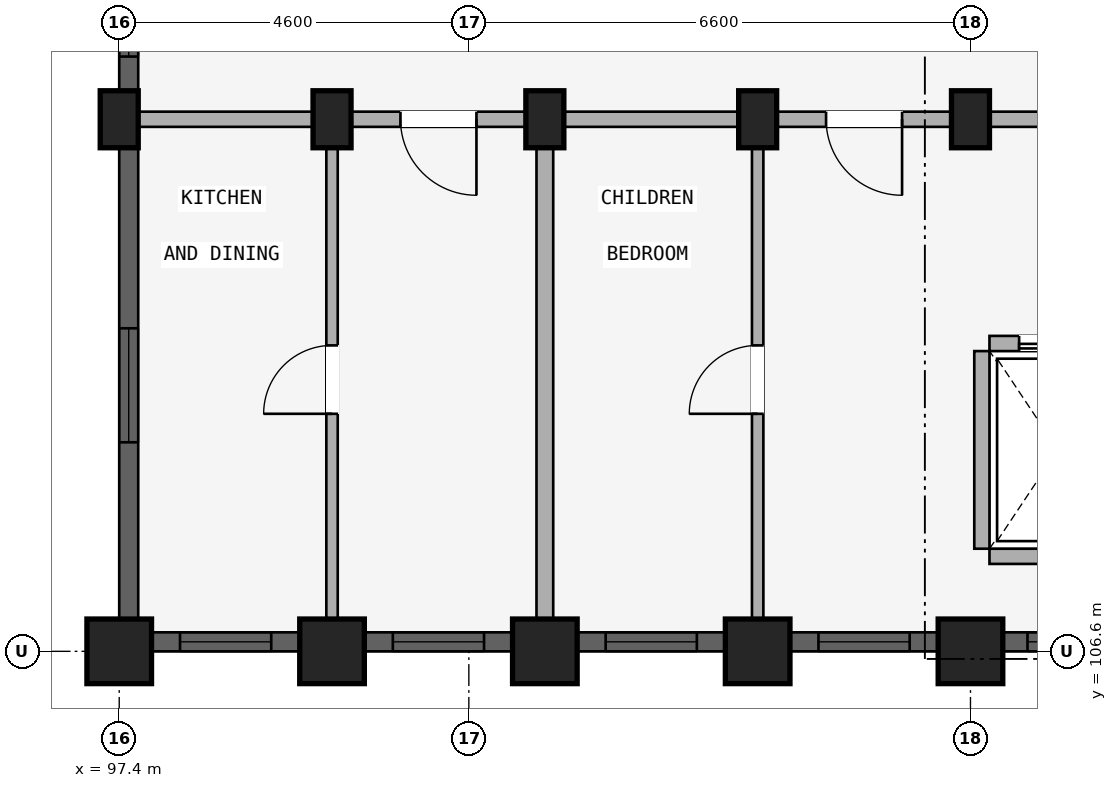
"""IFC4 building model, lengths in metres.
Left out: names, types, materials, properties, quantities, classifications, styles, units other than length and angle.
Written with IfcOpenShell. Run it as: python <this file> out.ifc"""

import sys

from ifc_helpers import new_model, si_unit, direction, frame, frame_2d, origin, origin_2d, place, context, subcontext, project, spatial, rectangle, extrude, element, fill, save


model = new_model("IFC4")
c1 = context("Model", 3, precision=1e-05, world=origin(), true_north=direction((0.0, 1.0)))
c2 = subcontext(c1, "Body", "Model", "MODEL_VIEW")
j1 = project(units=[si_unit("LENGTHUNIT", "METRE"), si_unit("PLANEANGLEUNIT", "RADIAN")], contexts=[c1])
p1 = place(None, origin())
s1 = spatial("IfcSite", under=j1, at=p1, CompositionType="ELEMENT")
p2 = place(p1, origin())
s2 = spatial("IfcBuilding", under=s1, at=p2, CompositionType="ELEMENT")
p3 = place(p2, frame((0.0, 0.0, 4.5)))
s3 = spatial("IfcBuildingStorey", under=s2, at=p3, CompositionType="ELEMENT", Elevation=4.5)
p4 = place(p3, frame((108.6, 106.6, 0.0), z_axis=(0.0, 0.0, 1.0), x_axis=(1.0, 0.0, 0.0)))
e1 = element("IfcColumn", 1, at=p4, inside=s3, PredefinedType="COLUMN", context=c2, shape_type="SweptSolid", body=[
    extrude(rectangle(XDim=0.85, YDim=0.85, at=origin_2d()), origin(), (0.0, 0.0, 1.0), 3.98),
])
p5 = place(p3, frame((108.6, 113.6, 0.0), z_axis=(0.0, 0.0, 1.0), x_axis=(1.0, 0.0, 0.0)))
e2 = element("IfcColumn", 2, at=p5, inside=s3, PredefinedType="COLUMN", context=c2, shape_type="SweptSolid", body=[
    extrude(rectangle(XDim=0.5, YDim=0.75, at=origin_2d()), origin(), (0.0, 0.0, 1.0), 3.98),
])
p6 = place(p3, frame((105.8, 106.6, 0.0), z_axis=(0.0, 0.0, 1.0), x_axis=(1.0, 0.0, 0.0)))
e3 = element("IfcColumn", 3, at=p6, inside=s3, PredefinedType="COLUMN", context=c2, shape_type="SweptSolid", body=[
    extrude(rectangle(XDim=0.85, YDim=0.85, at=origin_2d()), origin(), (0.0, 0.0, 1.0), 3.98),
])
p7 = place(p3, frame((105.8, 113.6, 0.0), z_axis=(0.0, 0.0, 1.0), x_axis=(1.0, 0.0, 0.0)))
e4 = element("IfcColumn", 4, at=p7, inside=s3, PredefinedType="COLUMN", context=c2, shape_type="SweptSolid", body=[
    extrude(rectangle(XDim=0.5, YDim=0.75, at=origin_2d()), origin(), (0.0, 0.0, 1.0), 3.98),
])
p8 = place(p3, frame((103.0, 106.6, 0.0), z_axis=(0.0, 0.0, 1.0), x_axis=(1.0, 0.0, 0.0)))
e5 = element("IfcColumn", 5, at=p8, inside=s3, PredefinedType="COLUMN", context=c2, shape_type="SweptSolid", body=[
    extrude(rectangle(XDim=0.85, YDim=0.85, at=origin_2d()), origin(), (0.0, 0.0, 1.0), 3.98),
])
p9 = place(p3, frame((103.0, 113.6, 0.0), z_axis=(0.0, 0.0, 1.0), x_axis=(1.0, 0.0, 0.0)))
e6 = element("IfcColumn", 6, at=p9, inside=s3, PredefinedType="COLUMN", context=c2, shape_type="SweptSolid", body=[
    extrude(rectangle(XDim=0.5, YDim=0.75, at=origin_2d()), origin(), (0.0, 0.0, 1.0), 3.98),
])
p10 = place(p3, frame((100.2, 106.6, 0.0), z_axis=(0.0, 0.0, 1.0), x_axis=(1.0, 0.0, 0.0)))
e7 = element("IfcColumn", 7, at=p10, inside=s3, PredefinedType="COLUMN", context=c2, shape_type="SweptSolid", body=[
    extrude(rectangle(XDim=0.85, YDim=0.85, at=origin_2d()), origin(), (0.0, 0.0, 1.0), 3.98),
])
p11 = place(p3, frame((100.2, 113.6, 0.0), z_axis=(0.0, 0.0, 1.0), x_axis=(1.0, 0.0, 0.0)))
e8 = element("IfcColumn", 8, at=p11, inside=s3, PredefinedType="COLUMN", context=c2, shape_type="SweptSolid", body=[
    extrude(rectangle(XDim=0.5, YDim=0.75, at=origin_2d()), origin(), (0.0, 0.0, 1.0), 3.98),
])
p12 = place(p3, frame((97.4, 106.6, 0.0), z_axis=(0.0, 0.0, 1.0), x_axis=(1.0, 0.0, 0.0)))
e9 = element("IfcColumn", 9, at=p12, inside=s3, PredefinedType="COLUMN", context=c2, shape_type="SweptSolid", body=[
    extrude(rectangle(XDim=0.85, YDim=0.85, at=origin_2d()), origin(), (0.0, 0.0, 1.0), 3.98),
])
p13 = place(p3, frame((97.4, 113.6, 0.0), z_axis=(0.0, 0.0, 1.0), x_axis=(1.0, 0.0, 0.0)))
e10 = element("IfcColumn", 10, at=p13, inside=s3, PredefinedType="COLUMN", context=c2, shape_type="SweptSolid", body=[
    extrude(rectangle(XDim=0.5, YDim=0.75, at=origin_2d()), origin(), (0.0, 0.0, 1.0), 3.98),
])
p14 = place(p3, frame((108.75, 107.95, 0.0), z_axis=(0.0, 0.0, 1.0), x_axis=(0.0, 1.0, 0.0)))
e11 = element("IfcWall", 11, at=p14, inside=s3, PredefinedType="STANDARD", context=c2, shape_type="SweptSolid", body=[
    extrude(rectangle(XDim=2.6, YDim=0.2, at=frame_2d((1.3, 0.0))), origin(), (0.0, 0.0, 1.0), 3.322),
])
p15 = place(p3, frame((110.65, 107.85, 0.0), z_axis=(0.0, 0.0, 1.0), x_axis=(-1.0, 0.0, 0.0)))
e12 = element("IfcWall", 12, at=p15, inside=s3, PredefinedType="STANDARD", context=c2, shape_type="SweptSolid", body=[
    extrude(rectangle(XDim=1.8, YDim=0.2, at=frame_2d((0.9, 0.0))), origin(), (0.0, 0.0, 1.0), 3.98),
])
p16 = place(p3, frame((110.65, 110.65, 0.0), z_axis=(0.0, 0.0, 1.0), x_axis=(-1.0, 0.0, 0.0)))
e13 = element("IfcWall", 13, at=p16, inside=s3, PredefinedType="STANDARD", context=c2, shape_type="SweptSolid", body=[
    extrude(rectangle(XDim=1.8, YDim=0.2, at=frame_2d((0.9, 0.0))), origin(), (0.0, 0.0, 1.0), 3.98),
])
p17 = place(p16, frame((0.39, 0.0, 0.0)))
e14 = element("IfcOpeningElement", 14, at=p17, cuts=e13, PredefinedType="OPENING", context=c2, shape_type="SweptSolid", body=[
    extrude(rectangle(XDim=1.02, YDim=2.15, at=frame_2d((0.51, 1.075))), frame((0.0, 0.11, 0.0), z_axis=(0.0, -1.0, 0.0), x_axis=(1.0, 0.0, 0.0)), (0.0, 0.0, 1.0), 0.22),
])
p18 = place(p3, frame((114.25, 113.6, 0.0), z_axis=(0.0, 0.0, 1.0), x_axis=(-1.0, 0.0, 0.0)))
e15 = element("IfcWall", 15, at=p18, inside=s3, PredefinedType="STANDARD", context=c2, shape_type="SweptSolid", body=[
    extrude(rectangle(XDim=5.6, YDim=0.2, at=frame_2d((2.8, 0.0))), origin(), (0.0, 0.0, 1.0), 3.322),
])
p19 = place(p18, frame((1.91, 0.0, 0.0)))
e16 = element("IfcOpeningElement", 16, at=p19, cuts=e15, PredefinedType="OPENING", context=c2, shape_type="SweptSolid", body=[
    extrude(rectangle(XDim=1.22, YDim=2.15, at=frame_2d((0.61, 1.075))), frame((0.0, 0.11, 0.0), z_axis=(0.0, -1.0, 0.0), x_axis=(1.0, 0.0, 0.0)), (0.0, 0.0, 1.0), 0.22),
])
p20 = place(p3, frame((108.6, 113.6, 0.0), z_axis=(0.0, 0.0, 1.0), x_axis=(-1.0, 0.0, 0.0)))
e17 = element("IfcWall", 17, at=p20, inside=s3, PredefinedType="STANDARD", context=c2, shape_type="SweptSolid", body=[
    extrude(rectangle(XDim=2.8, YDim=0.2, at=frame_2d((1.4, 0.0))), origin(), (0.0, 0.0, 1.0), 3.322),
])
p21 = place(p20, frame((0.9, 0.0, 0.0)))
e18 = element("IfcOpeningElement", 18, at=p21, cuts=e17, PredefinedType="OPENING", context=c2, shape_type="SweptSolid", body=[
    extrude(rectangle(XDim=1.0, YDim=2.15, at=frame_2d((0.5, 1.075))), frame((0.0, 0.11, 0.0), z_axis=(0.0, -1.0, 0.0), x_axis=(1.0, 0.0, 0.0)), (0.0, 0.0, 1.0), 0.22),
])
p22 = place(p3, frame((105.8, 113.6, 0.0), z_axis=(0.0, 0.0, 1.0), x_axis=(-1.0, 0.0, 0.0)))
e19 = element("IfcWall", 19, at=p22, inside=s3, PredefinedType="STANDARD", context=c2, shape_type="SweptSolid", body=[
    extrude(rectangle(XDim=2.8, YDim=0.2, at=frame_2d((1.4, 0.0))), origin(), (0.0, 0.0, 1.0), 3.322),
])
p23 = place(p3, frame((103.0, 113.6, 0.0), z_axis=(0.0, 0.0, 1.0), x_axis=(-1.0, 0.0, 0.0)))
e20 = element("IfcWall", 20, at=p23, inside=s3, PredefinedType="STANDARD", context=c2, shape_type="SweptSolid", body=[
    extrude(rectangle(XDim=2.8, YDim=0.2, at=frame_2d((1.4, 0.0))), origin(), (0.0, 0.0, 1.0), 3.322),
])
p24 = place(p23, frame((0.9, 0.0, 0.0)))
e21 = element("IfcOpeningElement", 21, at=p24, cuts=e20, PredefinedType="OPENING", context=c2, shape_type="SweptSolid", body=[
    extrude(rectangle(XDim=1.0, YDim=2.15, at=frame_2d((0.5, 1.075))), frame((0.0, 0.11, 0.0), z_axis=(0.0, -1.0, 0.0), x_axis=(1.0, 0.0, 0.0)), (0.0, 0.0, 1.0), 0.22),
])
p25 = place(p3, frame((100.2, 113.6, 0.0), z_axis=(0.0, 0.0, 1.0), x_axis=(-1.0, 0.0, 0.0)))
e22 = element("IfcWall", 22, at=p25, inside=s3, PredefinedType="STANDARD", context=c2, shape_type="SweptSolid", body=[
    extrude(rectangle(XDim=2.8, YDim=0.2, at=frame_2d((1.4, 0.0))), origin(), (0.0, 0.0, 1.0), 3.322),
])
p26 = place(p3, frame((105.8, 106.8, 0.0), z_axis=(0.0, 0.0, 1.0), x_axis=(0.0, 1.0, 0.0)))
e23 = element("IfcWall", 23, at=p26, inside=s3, PredefinedType="PARTITIONING", context=c2, shape_type="SweptSolid", body=[
    extrude(rectangle(XDim=6.75, YDim=0.15, at=frame_2d((3.375, 0.0))), origin(), (0.0, 0.0, 1.0), 3.322),
])
p27 = place(p26, frame((2.925, 0.0, 0.0)))
e24 = element("IfcOpeningElement", 24, at=p27, cuts=e23, PredefinedType="OPENING", context=c2, shape_type="SweptSolid", body=[
    extrude(rectangle(XDim=0.9, YDim=2.1, at=frame_2d((0.45, 1.05))), frame((0.0, 0.085, 0.0), z_axis=(0.0, -1.0, 0.0), x_axis=(1.0, 0.0, 0.0)), (0.0, 0.0, 1.0), 0.17),
])
p28 = place(p3, frame((103.0, 106.8, 0.0), z_axis=(0.0, 0.0, 1.0), x_axis=(0.0, 1.0, 0.0)))
e25 = element("IfcWall", 25, at=p28, inside=s3, PredefinedType="STANDARD", context=c2, shape_type="SweptSolid", body=[
    extrude(rectangle(XDim=6.75, YDim=0.22, at=frame_2d((3.375, 0.0))), origin(), (0.0, 0.0, 1.0), 3.322),
])
p29 = place(p3, frame((100.2, 106.8, 0.0), z_axis=(0.0, 0.0, 1.0), x_axis=(0.0, 1.0, 0.0)))
e26 = element("IfcWall", 26, at=p29, inside=s3, PredefinedType="PARTITIONING", context=c2, shape_type="SweptSolid", body=[
    extrude(rectangle(XDim=6.75, YDim=0.15, at=frame_2d((3.375, 0.0))), origin(), (0.0, 0.0, 1.0), 3.322),
])
p30 = place(p29, frame((2.925, 0.0, 0.0)))
e27 = element("IfcOpeningElement", 27, at=p30, cuts=e26, PredefinedType="OPENING", context=c2, shape_type="SweptSolid", body=[
    extrude(rectangle(XDim=0.9, YDim=2.1, at=frame_2d((0.45, 1.05))), frame((0.0, 0.085, 0.0), z_axis=(0.0, -1.0, 0.0), x_axis=(1.0, 0.0, 0.0)), (0.0, 0.0, 1.0), 0.17),
])
p31 = place(p3, frame((111.372, 106.725, 0.0), z_axis=(0.0, 0.0, 1.0), x_axis=(-1.0, 0.0, 0.0)))
e28 = element("IfcWall", 28, at=p31, inside=s3, PredefinedType="STANDARD", context=c2, shape_type="SweptSolid", body=[
    extrude(rectangle(XDim=2.422, YDim=0.25, at=frame_2d((1.211, 0.0))), origin(), (0.0, 0.0, 1.0), 3.522),
])
p32 = place(p31, frame((0.822, 0.0, 0.88)))
e29 = element("IfcOpeningElement", 29, at=p32, cuts=e28, PredefinedType="OPENING", context=c2, shape_type="SweptSolid", body=[
    extrude(rectangle(XDim=1.2, YDim=1.5, at=frame_2d((0.6, 0.75))), frame((0.0, 0.135, 0.0), z_axis=(0.0, -1.0, 0.0), x_axis=(1.0, 0.0, 0.0)), (0.0, 0.0, 1.0), 0.27),
])
p33 = place(p3, frame((108.18, 106.725, 0.0), z_axis=(0.0, 0.0, 1.0), x_axis=(-1.0, 0.0, 0.0)))
e30 = element("IfcWall", 30, at=p33, inside=s3, PredefinedType="STANDARD", context=c2, shape_type="SweptSolid", body=[
    extrude(rectangle(XDim=1.96, YDim=0.25, at=frame_2d((0.98, 0.0))), origin(), (0.0, 0.0, 1.0), 3.522),
])
p34 = place(p33, frame((0.38, 0.0, 0.88)))
e31 = element("IfcOpeningElement", 31, at=p34, cuts=e30, PredefinedType="OPENING", context=c2, shape_type="SweptSolid", body=[
    extrude(rectangle(XDim=1.2, YDim=1.5, at=frame_2d((0.6, 0.75))), frame((0.0, 0.135, 0.0), z_axis=(0.0, -1.0, 0.0), x_axis=(1.0, 0.0, 0.0)), (0.0, 0.0, 1.0), 0.27),
])
p35 = place(p3, frame((105.38, 106.725, 0.0), z_axis=(0.0, 0.0, 1.0), x_axis=(-1.0, 0.0, 0.0)))
e32 = element("IfcWall", 32, at=p35, inside=s3, PredefinedType="STANDARD", context=c2, shape_type="SweptSolid", body=[
    extrude(rectangle(XDim=1.96, YDim=0.25, at=frame_2d((0.98, 0.0))), origin(), (0.0, 0.0, 1.0), 3.522),
])
p36 = place(p35, frame((0.38, 0.0, 0.88)))
e33 = element("IfcOpeningElement", 33, at=p36, cuts=e32, PredefinedType="OPENING", context=c2, shape_type="SweptSolid", body=[
    extrude(rectangle(XDim=1.2, YDim=1.5, at=frame_2d((0.6, 0.75))), frame((0.0, 0.135, 0.0), z_axis=(0.0, -1.0, 0.0), x_axis=(1.0, 0.0, 0.0)), (0.0, 0.0, 1.0), 0.27),
])
p37 = place(p3, frame((102.58, 106.725, 0.0), z_axis=(0.0, 0.0, 1.0), x_axis=(-1.0, 0.0, 0.0)))
e34 = element("IfcWall", 34, at=p37, inside=s3, PredefinedType="STANDARD", context=c2, shape_type="SweptSolid", body=[
    extrude(rectangle(XDim=1.96, YDim=0.25, at=frame_2d((0.98, 0.0))), origin(), (0.0, 0.0, 1.0), 3.522),
])
p38 = place(p37, frame((0.38, 0.0, 0.88)))
e35 = element("IfcOpeningElement", 35, at=p38, cuts=e34, PredefinedType="OPENING", context=c2, shape_type="SweptSolid", body=[
    extrude(rectangle(XDim=1.2, YDim=1.5, at=frame_2d((0.6, 0.75))), frame((0.0, 0.135, 0.0), z_axis=(0.0, -1.0, 0.0), x_axis=(1.0, 0.0, 0.0)), (0.0, 0.0, 1.0), 0.27),
])
p39 = place(p3, frame((99.78, 106.725, 0.0), z_axis=(0.0, 0.0, 1.0), x_axis=(-1.0, 0.0, 0.0)))
e36 = element("IfcWall", 36, at=p39, inside=s3, PredefinedType="STANDARD", context=c2, shape_type="SweptSolid", body=[
    extrude(rectangle(XDim=1.96, YDim=0.25, at=frame_2d((0.98, 0.0))), origin(), (0.0, 0.0, 1.0), 3.522),
])
p40 = place(p39, frame((0.38, 0.0, 0.88)))
e37 = element("IfcOpeningElement", 37, at=p40, cuts=e36, PredefinedType="OPENING", context=c2, shape_type="SweptSolid", body=[
    extrude(rectangle(XDim=1.2, YDim=1.5, at=frame_2d((0.6, 0.75))), frame((0.0, 0.135, 0.0), z_axis=(0.0, -1.0, 0.0), x_axis=(1.0, 0.0, 0.0)), (0.0, 0.0, 1.0), 0.27),
])
p41 = place(p3, frame((97.525, 107.02, 0.0), z_axis=(0.0, 0.0, 1.0), x_axis=(0.0, 1.0, 0.0)))
e38 = element("IfcWall", 38, at=p41, inside=s3, PredefinedType="STANDARD", context=c2, shape_type="SweptSolid", body=[
    extrude(rectangle(XDim=6.201, YDim=0.25, at=frame_2d((3.101, 0.0))), origin(), (0.0, 0.0, 1.0), 3.322),
])
p42 = place(p41, frame((2.33, 0.0, 0.88)))
e39 = element("IfcOpeningElement", 39, at=p42, cuts=e38, PredefinedType="OPENING", context=c2, shape_type="SweptSolid", body=[
    extrude(rectangle(XDim=1.5, YDim=1.65, at=frame_2d((0.75, 0.825))), frame((0.0, 0.135, 0.0), z_axis=(0.0, -1.0, 0.0), x_axis=(1.0, 0.0, 0.0)), (0.0, 0.0, 1.0), 0.27),
])
p43 = place(p3, frame((97.525, 113.979, 0.0), z_axis=(0.0, 0.0, 1.0), x_axis=(0.0, 1.0, 0.0)))
e40 = element("IfcWall", 40, at=p43, inside=s3, PredefinedType="STANDARD", context=c2, shape_type="SweptSolid", body=[
    extrude(rectangle(XDim=1.643, YDim=0.25, at=frame_2d((0.822, 0.0))), origin(), (0.0, 0.0, 1.0), 3.322),
])
p44 = place(p43, frame((0.447, 0.0, 0.88)))
e41 = element("IfcOpeningElement", 41, at=p44, cuts=e40, PredefinedType="OPENING", context=c2, shape_type="SweptSolid", body=[
    extrude(rectangle(XDim=0.75, YDim=1.05, at=frame_2d((0.375, 0.525))), frame((0.0, 0.135, 0.0), z_axis=(0.0, -1.0, 0.0), x_axis=(1.0, 0.0, 0.0)), (0.0, 0.0, 1.0), 0.27),
])
p45 = place(p32, origin())
e42 = element("IfcWindow", 42, at=p45, inside=s3, PartitioningType="SINGLE_PANEL", PredefinedType="WINDOW", context=c2, shape_type="SweptSolid", body=[
    extrude(rectangle(XDim=1.2, YDim=1.5, at=frame_2d((0.6, 0.75))), frame((0.0, 0.03, 0.0), z_axis=(0.0, -1.0, 0.0), x_axis=(1.0, 0.0, 0.0)), (0.0, 0.0, 1.0), 0.06),
])
fill(e29, e42)
p46 = place(p34, origin())
e43 = element("IfcWindow", 43, at=p46, inside=s3, PartitioningType="SINGLE_PANEL", PredefinedType="WINDOW", context=c2, shape_type="SweptSolid", body=[
    extrude(rectangle(XDim=1.2, YDim=1.5, at=frame_2d((0.6, 0.75))), frame((0.0, 0.03, 0.0), z_axis=(0.0, -1.0, 0.0), x_axis=(1.0, 0.0, 0.0)), (0.0, 0.0, 1.0), 0.06),
])
fill(e31, e43)
p47 = place(p36, origin())
e44 = element("IfcWindow", 44, at=p47, inside=s3, PartitioningType="SINGLE_PANEL", PredefinedType="WINDOW", context=c2, shape_type="SweptSolid", body=[
    extrude(rectangle(XDim=1.2, YDim=1.5, at=frame_2d((0.6, 0.75))), frame((0.0, 0.03, 0.0), z_axis=(0.0, -1.0, 0.0), x_axis=(1.0, 0.0, 0.0)), (0.0, 0.0, 1.0), 0.06),
])
fill(e33, e44)
p48 = place(p38, origin())
e45 = element("IfcWindow", 45, at=p48, inside=s3, PartitioningType="SINGLE_PANEL", PredefinedType="WINDOW", context=c2, shape_type="SweptSolid", body=[
    extrude(rectangle(XDim=1.2, YDim=1.5, at=frame_2d((0.6, 0.75))), frame((0.0, 0.03, 0.0), z_axis=(0.0, -1.0, 0.0), x_axis=(1.0, 0.0, 0.0)), (0.0, 0.0, 1.0), 0.06),
])
fill(e35, e45)
p49 = place(p40, origin())
e46 = element("IfcWindow", 46, at=p49, inside=s3, PartitioningType="SINGLE_PANEL", PredefinedType="WINDOW", context=c2, shape_type="SweptSolid", body=[
    extrude(rectangle(XDim=1.2, YDim=1.5, at=frame_2d((0.6, 0.75))), frame((0.0, 0.03, 0.0), z_axis=(0.0, -1.0, 0.0), x_axis=(1.0, 0.0, 0.0)), (0.0, 0.0, 1.0), 0.06),
])
fill(e37, e46)
p50 = place(p42, origin())
e47 = element("IfcWindow", 47, at=p50, inside=s3, PartitioningType="DOUBLE_PANEL_VERTICAL", PredefinedType="WINDOW", context=c2, shape_type="SweptSolid", body=[
    extrude(rectangle(XDim=1.5, YDim=1.65, at=frame_2d((0.75, 0.825))), frame((0.0, 0.03, 0.0), z_axis=(0.0, -1.0, 0.0), x_axis=(1.0, 0.0, 0.0)), (0.0, 0.0, 1.0), 0.06),
])
fill(e39, e47)
p51 = place(p44, origin())
e48 = element("IfcWindow", 48, at=p51, inside=s3, PartitioningType="SINGLE_PANEL", PredefinedType="WINDOW", context=c2, shape_type="SweptSolid", body=[
    extrude(rectangle(XDim=0.75, YDim=1.05, at=frame_2d((0.375, 0.525))), frame((0.0, 0.03, 0.0), z_axis=(0.0, -1.0, 0.0), x_axis=(1.0, 0.0, 0.0)), (0.0, 0.0, 1.0), 0.06),
])
fill(e41, e48)
p52 = place(p17, origin())
e49 = element("IfcDoor", 49, at=p52, inside=s3, OperationType="SLIDING_TO_RIGHT", PredefinedType="DOOR", context=c2, shape_type="SweptSolid", body=[
    extrude(rectangle(XDim=1.02, YDim=2.15, at=frame_2d((0.51, 1.075))), frame((0.0, 0.025, 0.0), z_axis=(0.0, -1.0, 0.0), x_axis=(1.0, 0.0, 0.0)), (0.0, 0.0, 1.0), 0.05),
])
fill(e14, e49)
p53 = place(p21, frame((1.0, 0.0, 0.0), z_axis=(0.0, 0.0, 1.0), x_axis=(-1.0, 0.0, 0.0)))
e50 = element("IfcDoor", 50, at=p53, inside=s3, OperationType="SINGLE_SWING_RIGHT", PredefinedType="DOOR", context=c2, shape_type="SweptSolid", body=[
    extrude(rectangle(XDim=1.0, YDim=2.15, at=frame_2d((0.5, 1.075))), frame((0.0, 0.025, 0.0), z_axis=(0.0, -1.0, 0.0), x_axis=(1.0, 0.0, 0.0)), (0.0, 0.0, 1.0), 0.05),
])
fill(e18, e50)
p54 = place(p24, frame((1.0, 0.0, 0.0), z_axis=(0.0, 0.0, 1.0), x_axis=(-1.0, 0.0, 0.0)))
e51 = element("IfcDoor", 51, at=p54, inside=s3, OperationType="SINGLE_SWING_RIGHT", PredefinedType="DOOR", context=c2, shape_type="SweptSolid", body=[
    extrude(rectangle(XDim=1.0, YDim=2.15, at=frame_2d((0.5, 1.075))), frame((0.0, 0.025, 0.0), z_axis=(0.0, -1.0, 0.0), x_axis=(1.0, 0.0, 0.0)), (0.0, 0.0, 1.0), 0.05),
])
fill(e21, e51)
p55 = place(p27, origin())
e52 = element("IfcDoor", 52, at=p55, inside=s3, OperationType="SINGLE_SWING_LEFT", PredefinedType="DOOR", context=c2, shape_type="SweptSolid", body=[
    extrude(rectangle(XDim=0.9, YDim=2.1, at=frame_2d((0.45, 1.05))), frame((0.0, 0.025, 0.0), z_axis=(0.0, -1.0, 0.0), x_axis=(1.0, 0.0, 0.0)), (0.0, 0.0, 1.0), 0.05),
])
fill(e24, e52)
p56 = place(p30, frame((0.9, 0.0, 0.0), z_axis=(0.0, 0.0, 1.0), x_axis=(-1.0, 0.0, 0.0)))
e53 = element("IfcDoor", 53, at=p56, inside=s3, OperationType="SINGLE_SWING_RIGHT", PredefinedType="DOOR", context=c2, shape_type="SweptSolid", body=[
    extrude(rectangle(XDim=0.9, YDim=2.1, at=frame_2d((0.45, 1.05))), frame((0.0, 0.025, 0.0), z_axis=(0.0, -1.0, 0.0), x_axis=(1.0, 0.0, 0.0)), (0.0, 0.0, 1.0), 0.05),
])
fill(e27, e53)
save(model, sys.argv[1])
